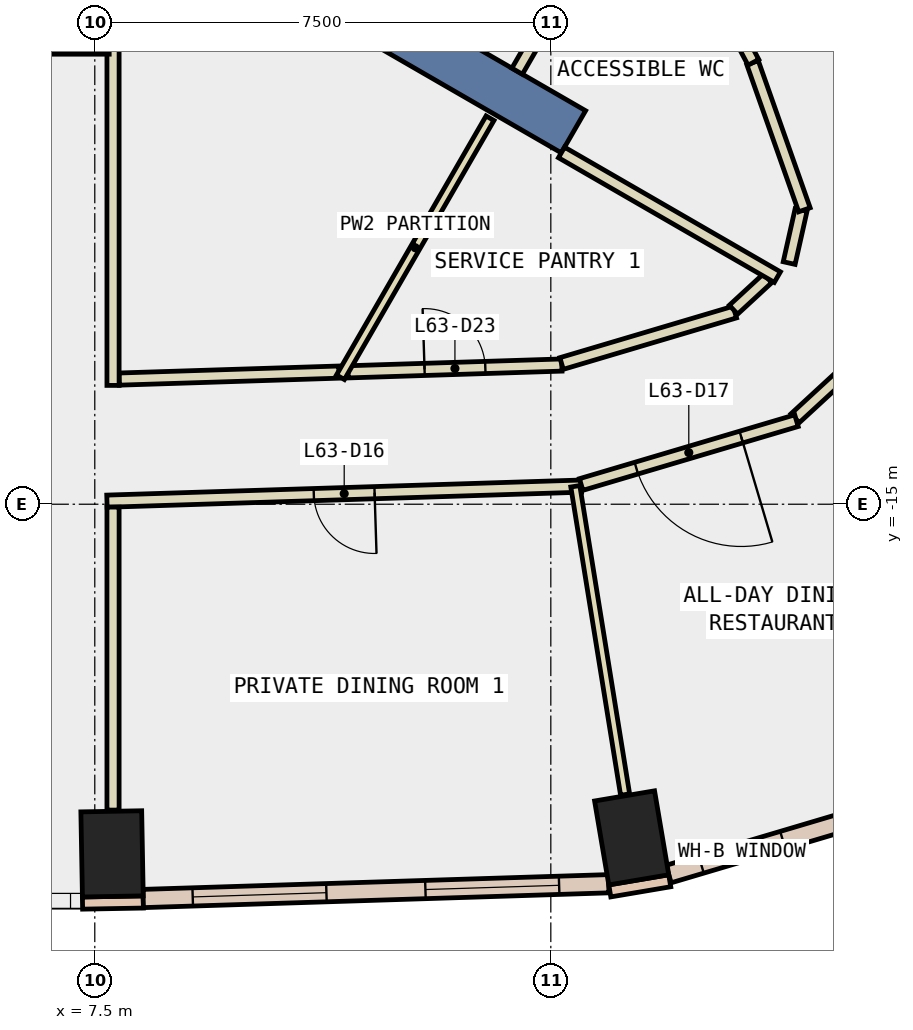
"""IFC4 building model, lengths in metres.
Left out: names, types, materials, properties, quantities, classifications, styles, units other than length and angle.
Written with IfcOpenShell. Run it as: python <this file> out.ifc"""

import sys

from ifc_helpers import new_model, si_unit, direction, frame, frame_2d, origin, origin_2d, place, context, subcontext, project, spatial, rectangle, extrude, element, fill, save


model = new_model("IFC4")
c1 = context("Model", 3, precision=1e-05, world=origin(), true_north=direction((0.0, 1.0)))
c2 = subcontext(c1, "Body", "Model", "MODEL_VIEW")
j1 = project(units=[si_unit("LENGTHUNIT", "METRE"), si_unit("PLANEANGLEUNIT", "RADIAN")], contexts=[c1])
p1 = place(None, origin())
s1 = spatial("IfcSite", under=j1, at=p1, CompositionType="ELEMENT")
p2 = place(p1, origin())
s2 = spatial("IfcBuilding", under=s1, at=p2, CompositionType="ELEMENT")
p3 = place(p2, frame((0.0, 0.0, 273.8)))
s3 = spatial("IfcBuildingStorey", under=s2, at=p3, CompositionType="ELEMENT", Elevation=273.8)
for number, where, z_axis, x_axis in (
    (1, (7.784, -20.75, -0.34), (0.0, 0.0, 1.0), (1.0, 0.018, 0.0)),
    (2, (16.33, -20.487, -0.34), (0.0, 0.0, 1.0), (0.986, 0.167, 0.0)),
):
    element("IfcColumn", number, at=place(p3, frame(where, z_axis=z_axis, x_axis=x_axis)), inside=s3, PredefinedType="COLUMN", context=c2, shape_type="SweptSolid", body=[
        extrude(rectangle(XDim=1.0, YDim=1.4, at=origin_2d()), origin(), (0.0, 0.0, 1.0), 3.6),
    ])
p4 = place(p3, frame((7.578, -4.375, -0.34), z_axis=(0.0, 0.0, 1.0), x_axis=(0.866024315419, -0.5000018851, 0.0)))
e3 = element("IfcWall", 3, at=p4, inside=s3, PredefinedType="SHEAR", context=c2, shape_type="SweptSolid", body=[
    extrude(rectangle(XDim=9.0, YDim=0.8, at=frame_2d((4.5, 0.0))), origin(), (0.0, 0.0, 1.0), 3.6),
])
for number, where, z_axis, x_axis in (
    (4, (7.298, -21.559, 0.0), (0.0, 0.0, 1.0), (1.0, 0.018, 0.0)),
    (5, (15.97, -21.359, 0.0), (0.0, 0.0, 1.0), (0.986, 0.167, 0.0)),
):
    element("IfcWall", number, at=place(p3, frame(where, z_axis=z_axis, x_axis=x_axis)), inside=s3, PredefinedType="STANDARD", context=c2, shape_type="SweptSolid", body=[
        extrude(rectangle(XDim=1.0, YDim=0.2, at=frame_2d((0.5, 0.0))), origin(), (0.0, 0.0, 1.0), 3.26),
    ])
p5 = place(p3, frame((8.296, -21.484, 0.0), z_axis=(0.0, 0.0, 1.0), x_axis=(0.999496876383, 0.031717410046, 0.0)))
e6 = element("IfcWall", 6, at=p5, inside=s3, PredefinedType="STANDARD", context=c2, shape_type="SweptSolid", body=[
    extrude(rectangle(XDim=7.659, YDim=0.3, at=frame_2d((3.83, 0.0))), origin(), (0.0, 0.0, 1.0), 3.26),
])
p6 = place(p5, frame((0.815, 0.0, 0.9)))
e7 = element("IfcOpeningElement", 7, at=p6, cuts=e6, PredefinedType="OPENING", context=c2, shape_type="SweptSolid", body=[
    extrude(rectangle(XDim=2.2, YDim=2.0, at=frame_2d((1.1, 1.0))), frame((0.0, 0.16, 0.0), z_axis=(0.0, -1.0, 0.0), x_axis=(1.0, 0.0, 0.0)), (0.0, 0.0, 1.0), 0.32),
])
p7 = place(p5, frame((4.644, 0.0, 0.9)))
e8 = element("IfcOpeningElement", 8, at=p7, cuts=e6, PredefinedType="OPENING", context=c2, shape_type="SweptSolid", body=[
    extrude(rectangle(XDim=2.2, YDim=2.0, at=frame_2d((1.1, 1.0))), frame((0.0, 0.16, 0.0), z_axis=(0.0, -1.0, 0.0), x_axis=(1.0, 0.0, 0.0)), (0.0, 0.0, 1.0), 0.32),
])
p8 = place(p3, frame((16.937, -21.082, 0.0), z_axis=(0.0, 0.0, 1.0), x_axis=(0.95864045837, 0.284619872067, 0.0)))
e9 = element("IfcWall", 9, at=p8, inside=s3, PredefinedType="STANDARD", context=c2, shape_type="SweptSolid", body=[
    extrude(rectangle(XDim=5.035, YDim=0.3, at=frame_2d((2.518, 0.0))), origin(), (0.0, 0.0, 1.0), 3.26),
])
p9 = place(p8, frame((0.559, 0.0, 0.9)))
e10 = element("IfcOpeningElement", 10, at=p9, cuts=e9, PredefinedType="OPENING", context=c2, shape_type="SweptSolid", body=[
    extrude(rectangle(XDim=1.4, YDim=2.0, at=frame_2d((0.7, 1.0))), frame((0.0, 0.16, 0.0), z_axis=(0.0, -1.0, 0.0), x_axis=(1.0, 0.0, 0.0)), (0.0, 0.0, 1.0), 0.32),
])
p10 = place(p8, frame((3.076, 0.0, 0.9)))
e11 = element("IfcOpeningElement", 11, at=p10, cuts=e9, PredefinedType="OPENING", context=c2, shape_type="SweptSolid", body=[
    extrude(rectangle(XDim=1.4, YDim=2.0, at=frame_2d((0.7, 1.0))), frame((0.0, 0.16, 0.0), z_axis=(0.0, -1.0, 0.0), x_axis=(1.0, 0.0, 0.0)), (0.0, 0.0, 1.0), 0.32),
])
p11 = place(p3, frame((7.9, -12.942, 0.0), z_axis=(0.0, 0.0, 1.0), x_axis=(0.999494468474, 0.031793198801, 0.0)))
e12 = element("IfcWall", 12, at=p11, inside=s3, PredefinedType="PARTITIONING", context=c2, shape_type="SweptSolid", body=[
    extrude(rectangle(XDim=3.617, YDim=0.2, at=frame_2d((1.808, 0.0))), origin(), (0.0, 0.0, 1.0), 3.26),
])
p12 = place(p3, frame((11.665, -12.823, 0.0), z_axis=(0.0, 0.0, 1.0), x_axis=(0.99949244941, 0.03185660956, 0.0)))
e13 = element("IfcWall", 13, at=p12, inside=s3, PredefinedType="PARTITIONING", context=c2, shape_type="SweptSolid", body=[
    extrude(rectangle(XDim=3.518, YDim=0.2, at=frame_2d((1.759, 0.0))), origin(), (0.0, 0.0, 1.0), 3.26),
])
p13 = place(p12, frame((1.259, 0.0, 0.0)))
e14 = element("IfcOpeningElement", 14, at=p13, cuts=e13, PredefinedType="OPENING", context=c2, shape_type="SweptSolid", body=[
    extrude(rectangle(XDim=1.0, YDim=2.1, at=frame_2d((0.5, 1.05))), frame((0.0, 0.11, 0.0), z_axis=(0.0, -1.0, 0.0), x_axis=(1.0, 0.0, 0.0)), (0.0, 0.0, 1.0), 0.22),
])
p14 = place(p3, frame((15.177, -12.686, 0.0), z_axis=(0.0, 0.0, 1.0), x_axis=(0.958629704259, 0.284656090947, 0.0)))
e15 = element("IfcWall", 15, at=p14, inside=s3, PredefinedType="PARTITIONING", context=c2, shape_type="SweptSolid", body=[
    extrude(rectangle(XDim=2.972, YDim=0.2, at=frame_2d((1.486, 0.0))), origin(), (0.0, 0.0, 1.0), 3.26),
])
p15 = place(p3, frame((18.004, -11.801, 0.0), z_axis=(0.0, 0.0, 1.0), x_axis=(0.735268601872, 0.677775835436, 0.0)))
e16 = element("IfcWall", 16, at=p15, inside=s3, PredefinedType="PARTITIONING", context=c2, shape_type="SweptSolid", body=[
    extrude(rectangle(XDim=0.764, YDim=0.2, at=frame_2d((0.382, 0.0))), origin(), (0.0, 0.0, 1.0), 3.26),
])
p16 = place(p3, frame((18.92, -11.034, 0.0), z_axis=(0.0, 0.0, 1.0), x_axis=(0.219096654714, 0.975703159723, 0.0)))
e17 = element("IfcWall", 17, at=p16, inside=s3, PredefinedType="PARTITIONING", context=c2, shape_type="SweptSolid", body=[
    extrude(rectangle(XDim=0.895, YDim=0.2, at=frame_2d((0.447, 0.0))), origin(), (0.0, 0.0, 1.0), 3.26),
])
p17 = place(p3, frame((19.171, -10.158, 0.0), z_axis=(0.0, 0.0, 1.0), x_axis=(-0.332486504777, 0.943108012977, 0.0)))
e18 = element("IfcWall", 18, at=p17, inside=s3, PredefinedType="PARTITIONING", context=c2, shape_type="SweptSolid", body=[
    extrude(rectangle(XDim=2.565, YDim=0.2, at=frame_2d((1.282, 0.0))), origin(), (0.0, 0.0, 1.0), 3.26),
])
p18 = place(p3, frame((18.332, -7.733, 0.0), z_axis=(0.0, 0.0, 1.0), x_axis=(-0.469639737924, 0.882858152006, 0.0)))
e19 = element("IfcWall", 19, at=p18, inside=s3, PredefinedType="PARTITIONING", context=c2, shape_type="SweptSolid", body=[
    extrude(rectangle(XDim=3.782, YDim=0.2, at=frame_2d((1.891, 0.0))), origin(), (0.0, 0.0, 1.0), 3.26),
])
p19 = place(p18, frame((1.391, 0.0, 0.0)))
e20 = element("IfcOpeningElement", 20, at=p19, cuts=e19, PredefinedType="OPENING", context=c2, shape_type="SweptSolid", body=[
    extrude(rectangle(XDim=1.0, YDim=2.1, at=frame_2d((0.5, 1.05))), frame((0.0, 0.11, 0.0), z_axis=(0.0, -1.0, 0.0), x_axis=(1.0, 0.0, 0.0)), (0.0, 0.0, 1.0), 0.22),
])
p20 = place(p3, frame((15.503, -14.702, 0.0), z_axis=(0.0, 0.0, 1.0), x_axis=(-0.999495120537, -0.031772693047, 0.0)))
e21 = element("IfcWall", 21, at=p20, inside=s3, PredefinedType="PARTITIONING", context=c2, shape_type="SweptSolid", body=[
    extrude(rectangle(XDim=7.807, YDim=0.2, at=frame_2d((3.903, 0.0))), origin(), (0.0, 0.0, 1.0), 3.26),
])
p21 = place(p20, frame((3.403, 0.0, 0.0)))
e22 = element("IfcOpeningElement", 22, at=p21, cuts=e21, PredefinedType="OPENING", context=c2, shape_type="SweptSolid", body=[
    extrude(rectangle(XDim=1.0, YDim=2.1, at=frame_2d((0.5, 1.05))), frame((0.0, 0.11, 0.0), z_axis=(0.0, -1.0, 0.0), x_axis=(1.0, 0.0, 0.0)), (0.0, 0.0, 1.0), 0.22),
])
p22 = place(p3, frame((20.83, -11.917, 0.0), z_axis=(0.0, 0.0, 1.0), x_axis=(-0.735547704352, -0.67747293276, 0.0)))
e23 = element("IfcWall", 23, at=p22, inside=s3, PredefinedType="PARTITIONING", context=c2, shape_type="SweptSolid", body=[
    extrude(rectangle(XDim=2.463, YDim=0.2, at=frame_2d((1.232, 0.0))), origin(), (0.0, 0.0, 1.0), 3.26),
])
p23 = place(p3, frame((19.04, -13.626, 0.0), z_axis=(0.0, 0.0, 1.0), x_axis=(-0.958734738219, -0.284302131073, 0.0)))
e24 = element("IfcWall", 24, at=p23, inside=s3, PredefinedType="PARTITIONING", context=c2, shape_type="SweptSolid", body=[
    extrude(rectangle(XDim=3.693, YDim=0.2, at=frame_2d((1.847, 0.0))), origin(), (0.0, 0.0, 1.0), 3.26),
])
p24 = place(p23, frame((0.947, 0.0, 0.0)))
e25 = element("IfcOpeningElement", 25, at=p24, cuts=e24, PredefinedType="OPENING", context=c2, shape_type="SweptSolid", body=[
    extrude(rectangle(XDim=1.8, YDim=2.1, at=frame_2d((0.9, 1.05))), frame((0.0, 0.11, 0.0), z_axis=(0.0, -1.0, 0.0), x_axis=(1.0, 0.0, 0.0)), (0.0, 0.0, 1.0), 0.22),
])
p25 = place(p3, frame((7.8, -7.499, 0.0), z_axis=(0.0, 0.0, 1.0), x_axis=(0.0, -1.0, 0.0)))
e26 = element("IfcWall", 26, at=p25, inside=s3, PredefinedType="PARTITIONING", context=c2, shape_type="SweptSolid", body=[
    extrude(rectangle(XDim=5.547, YDim=0.2, at=frame_2d((2.773, 0.0))), origin(), (0.0, 0.0, 1.0), 3.26),
])
p26 = place(p3, frame((7.8, -15.047, 0.0), z_axis=(0.0, 0.0, 1.0), x_axis=(0.0, -1.0, 0.0)))
e27 = element("IfcWall", 27, at=p26, inside=s3, PredefinedType="PARTITIONING", context=c2, shape_type="SweptSolid", body=[
    extrude(rectangle(XDim=4.983, YDim=0.2, at=frame_2d((2.491, 0.0))), origin(), (0.0, 0.0, 1.0), 3.26),
])
p27 = place(p3, frame((14.0, -8.652, 0.0), z_axis=(0.0, 0.0, 1.0), x_axis=(-0.500067562424, -0.865986393087, 0.0)))
e28 = element("IfcWall", 28, at=p27, inside=s3, PredefinedType="PARTITIONING", context=c2, shape_type="SweptSolid", body=[
    extrude(rectangle(XDim=4.919, YDim=0.15, at=frame_2d((2.459, 0.0))), origin(), (0.0, 0.0, 1.0), 3.26),
])
p28 = place(p3, frame((16.559, -4.219, 0.0), z_axis=(0.0, 0.0, 1.0), x_axis=(-0.499997491977, -0.866026851788, 0.0)))
e29 = element("IfcWall", 29, at=p28, inside=s3, PredefinedType="PARTITIONING", context=c2, shape_type="SweptSolid", body=[
    extrude(rectangle(XDim=4.226, YDim=0.2, at=frame_2d((2.113, 0.0))), origin(), (0.0, 0.0, 1.0), 3.26),
])
p29 = place(p3, frame((15.176, -9.215, 0.0), z_axis=(0.0, 0.0, 1.0), x_axis=(0.866006068523, -0.500033488159, 0.0)))
e30 = element("IfcWall", 30, at=p29, inside=s3, PredefinedType="PARTITIONING", context=c2, shape_type="SweptSolid", body=[
    extrude(rectangle(XDim=4.099, YDim=0.2, at=frame_2d((2.05, 0.0))), origin(), (0.0, 0.0, 1.0), 3.26),
])
p30 = place(p3, frame((15.403, -14.705, 0.0), z_axis=(0.0, 0.0, 1.0), x_axis=(0.159447664828, -0.98720638277, 0.0)))
e31 = element("IfcWall", 31, at=p30, inside=s3, PredefinedType="PARTITIONING", context=c2, shape_type="SweptSolid", body=[
    extrude(rectangle(XDim=5.135, YDim=0.15, at=frame_2d((2.568, 0.0))), origin(), (0.0, 0.0, 1.0), 3.26),
])
p31 = place(p3, frame((5.944, -7.499, 0.0), z_axis=(0.0, 0.0, 1.0), x_axis=(1.0, 0.0, 0.0)))
e32 = element("IfcWall", 32, at=p31, inside=s3, PredefinedType="PARTITIONING", context=c2, shape_type="SweptSolid", body=[
    extrude(rectangle(XDim=1.793, YDim=0.2, at=frame_2d((0.896, 0.0))), origin(), (0.0, 0.0, 1.0), 3.26),
])
p32 = place(p6, origin())
e33 = element("IfcWindow", 33, at=p32, inside=s3, PartitioningType="SINGLE_PANEL", PredefinedType="WINDOW", context=c2, shape_type="SweptSolid", body=[
    extrude(rectangle(XDim=2.2, YDim=2.0, at=frame_2d((1.1, 1.0))), frame((0.0, 0.03, 0.0), z_axis=(0.0, -1.0, 0.0), x_axis=(1.0, 0.0, 0.0)), (0.0, 0.0, 1.0), 0.06),
])
fill(e7, e33)
p33 = place(p7, origin())
e34 = element("IfcWindow", 34, at=p33, inside=s3, PartitioningType="SINGLE_PANEL", PredefinedType="WINDOW", context=c2, shape_type="SweptSolid", body=[
    extrude(rectangle(XDim=2.2, YDim=2.0, at=frame_2d((1.1, 1.0))), frame((0.0, 0.03, 0.0), z_axis=(0.0, -1.0, 0.0), x_axis=(1.0, 0.0, 0.0)), (0.0, 0.0, 1.0), 0.06),
])
fill(e8, e34)
p34 = place(p9, origin())
e35 = element("IfcWindow", 35, at=p34, inside=s3, PartitioningType="SINGLE_PANEL", PredefinedType="WINDOW", context=c2, shape_type="SweptSolid", body=[
    extrude(rectangle(XDim=1.4, YDim=2.0, at=frame_2d((0.7, 1.0))), frame((0.0, 0.03, 0.0), z_axis=(0.0, -1.0, 0.0), x_axis=(1.0, 0.0, 0.0)), (0.0, 0.0, 1.0), 0.06),
])
fill(e10, e35)
p35 = place(p21, origin())
e36 = element("IfcDoor", 36, at=p35, inside=s3, OperationType="SINGLE_SWING_LEFT", PredefinedType="DOOR", context=c2, shape_type="SweptSolid", body=[
    extrude(rectangle(XDim=1.0, YDim=2.1, at=frame_2d((0.5, 1.05))), frame((0.0, 0.025, 0.0), z_axis=(0.0, -1.0, 0.0), x_axis=(1.0, 0.0, 0.0)), (0.0, 0.0, 1.0), 0.05),
])
fill(e22, e36)
p36 = place(p24, origin())
e37 = element("IfcDoor", 37, at=p36, inside=s3, OperationType="DOUBLE_DOOR_SINGLE_SWING", PredefinedType="DOOR", context=c2, shape_type="SweptSolid", body=[
    extrude(rectangle(XDim=1.8, YDim=2.1, at=frame_2d((0.9, 1.05))), frame((0.0, 0.025, 0.0), z_axis=(0.0, -1.0, 0.0), x_axis=(1.0, 0.0, 0.0)), (0.0, 0.0, 1.0), 0.05),
])
fill(e25, e37)
p37 = place(p13, origin())
e38 = element("IfcDoor", 38, at=p37, inside=s3, OperationType="SINGLE_SWING_RIGHT", PredefinedType="DOOR", context=c2, shape_type="SweptSolid", body=[
    extrude(rectangle(XDim=1.0, YDim=2.1, at=frame_2d((0.5, 1.05))), frame((0.0, 0.025, 0.0), z_axis=(0.0, -1.0, 0.0), x_axis=(1.0, 0.0, 0.0)), (0.0, 0.0, 1.0), 0.05),
])
fill(e14, e38)
save(model, sys.argv[1])
